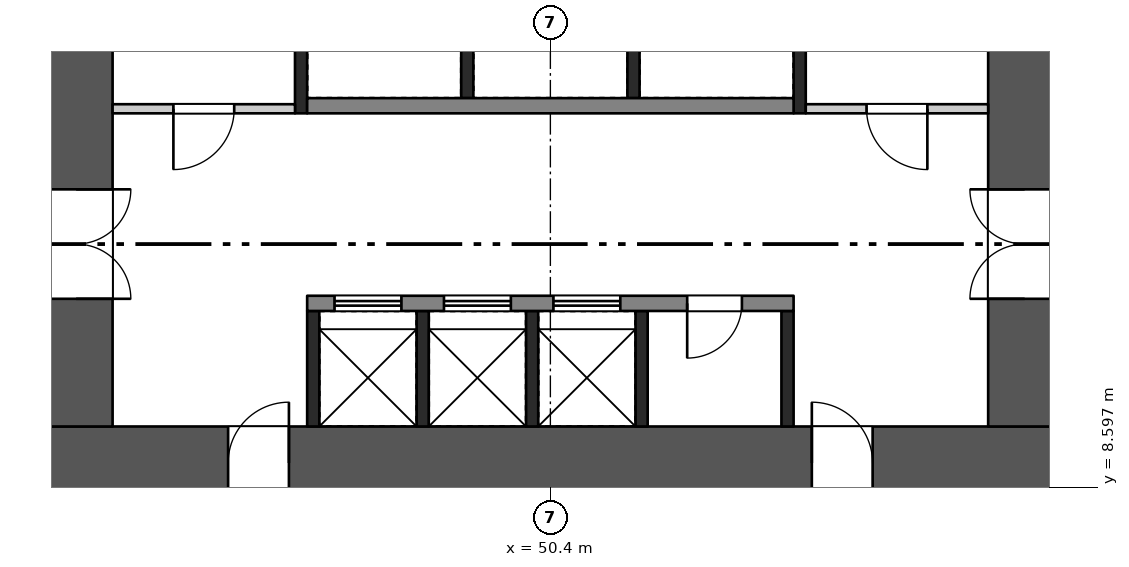
"""IFC4 building model, lengths in metres.
Left out: names, types, materials, properties, quantities, classifications, styles, units other than length and angle.
Written with IfcOpenShell. Run it as: python <this file> out.ifc"""

import sys

from ifc_helpers import new_model, si_unit, direction, frame, frame_2d, origin, place, context, subcontext, project, spatial, rectangle, extrude, element, fill, save


model = new_model("IFC4")
c1 = context("Model", 3, precision=1e-05, world=origin(), true_north=direction((0.0, 1.0)))
c2 = subcontext(c1, "Body", "Model", "MODEL_VIEW")
j1 = project(units=[si_unit("LENGTHUNIT", "METRE"), si_unit("PLANEANGLEUNIT", "RADIAN")], contexts=[c1])
p1 = place(None, origin())
s1 = spatial("IfcSite", under=j1, at=p1, CompositionType="ELEMENT")
p2 = place(p1, origin())
s2 = spatial("IfcBuilding", under=s1, at=p2, CompositionType="ELEMENT")
p3 = place(p2, frame((0.0, 0.0, 67.2)))
s3 = spatial("IfcBuildingStorey", under=s2, at=p3, CompositionType="ELEMENT", Elevation=67.2)
p4 = place(p3, frame((42.0, 9.0, 0.0), z_axis=(0.0, 0.0, 1.0), x_axis=(1.0, 0.0, 0.0)))
e1 = element("IfcWall", 1, at=p4, inside=s3, PredefinedType="SHEAR", context=c2, shape_type="SweptSolid", body=[
    extrude(rectangle(XDim=16.8, YDim=1.2, at=frame_2d((8.4, 0.0))), origin(), (0.0, 0.0, 1.0), 3.22),
])
p5 = place(p4, frame((3.1, 0.0, 0.0)))
e2 = element("IfcOpeningElement", 2, at=p5, cuts=e1, PredefinedType="OPENING", context=c2, shape_type="SweptSolid", body=[
    extrude(rectangle(XDim=1.0, YDim=2.1, at=frame_2d((0.5, 1.05))), frame((0.0, 0.61, 0.0), z_axis=(0.0, -1.0, 0.0), x_axis=(1.0, 0.0, 0.0)), (0.0, 0.0, 1.0), 1.22),
])
p6 = place(p4, frame((12.7, 0.0, 0.0)))
e3 = element("IfcOpeningElement", 3, at=p6, cuts=e1, PredefinedType="OPENING", context=c2, shape_type="SweptSolid", body=[
    extrude(rectangle(XDim=1.0, YDim=2.1, at=frame_2d((0.5, 1.05))), frame((0.0, 0.61, 0.0), z_axis=(0.0, -1.0, 0.0), x_axis=(1.0, 0.0, 0.0)), (0.0, 0.0, 1.0), 1.22),
])
p7 = place(p3, frame((42.6, 9.6, 0.0), z_axis=(0.0, 0.0, 1.0), x_axis=(0.0, 1.0, 0.0)))
e4 = element("IfcWall", 4, at=p7, inside=s3, PredefinedType="SHEAR", context=c2, shape_type="SweptSolid", body=[
    extrude(rectangle(XDim=14.4, YDim=1.2, at=frame_2d((7.2, 0.0))), origin(), (0.0, 0.0, 1.0), 3.22),
])
p8 = place(p7, frame((2.1, 0.0, 0.0)))
e5 = element("IfcOpeningElement", 5, at=p8, cuts=e4, PredefinedType="OPENING", context=c2, shape_type="SweptSolid", body=[
    extrude(rectangle(XDim=1.8, YDim=2.1, at=frame_2d((0.9, 1.05))), frame((0.0, 0.61, 0.0), z_axis=(0.0, -1.0, 0.0), x_axis=(1.0, 0.0, 0.0)), (0.0, 0.0, 1.0), 1.22),
])
p9 = place(p3, frame((58.2, 9.6, 0.0), z_axis=(0.0, 0.0, 1.0), x_axis=(0.0, 1.0, 0.0)))
e6 = element("IfcWall", 6, at=p9, inside=s3, PredefinedType="SHEAR", context=c2, shape_type="SweptSolid", body=[
    extrude(rectangle(XDim=14.4, YDim=1.2, at=frame_2d((7.2, 0.0))), origin(), (0.0, 0.0, 1.0), 3.22),
])
p10 = place(p9, frame((2.1, 0.0, 0.0)))
e7 = element("IfcOpeningElement", 7, at=p10, cuts=e6, PredefinedType="OPENING", context=c2, shape_type="SweptSolid", body=[
    extrude(rectangle(XDim=1.8, YDim=2.1, at=frame_2d((0.9, 1.05))), frame((0.0, 0.61, 0.0), z_axis=(0.0, -1.0, 0.0), x_axis=(1.0, 0.0, 0.0)), (0.0, 0.0, 1.0), 1.22),
])
for number, where, z_axis, x_axis in (
    (8, (46.5, 9.6, 0.0), (0.0, 0.0, 1.0), (0.0, 1.0, 0.0)),
    (9, (48.3, 9.6, 0.0), (0.0, 0.0, 1.0), (0.0, 1.0, 0.0)),
    (10, (50.1, 9.6, 0.0), (0.0, 0.0, 1.0), (0.0, 1.0, 0.0)),
    (11, (51.9, 9.6, 0.0), (0.0, 0.0, 1.0), (0.0, 1.0, 0.0)),
    (12, (54.3, 9.6, 0.0), (0.0, 0.0, 1.0), (0.0, 1.0, 0.0)),
):
    element("IfcWall", number, at=place(p3, frame(where, z_axis=z_axis, x_axis=x_axis)), inside=s3, PredefinedType="SHEAR", context=c2, shape_type="SweptSolid", body=[
        extrude(rectangle(XDim=1.9, YDim=0.2, at=frame_2d((0.95, 0.0))), origin(), (0.0, 0.0, 1.0), 3.22),
    ])
p11 = place(p3, frame((46.4, 11.625, 0.0), z_axis=(0.0, 0.0, 1.0), x_axis=(1.0, 0.0, 0.0)))
e13 = element("IfcWall", 13, at=p11, inside=s3, PredefinedType="SHEAR", context=c2, shape_type="SweptSolid", body=[
    extrude(rectangle(XDim=8.0, YDim=0.25, at=frame_2d((4.0, 0.0))), origin(), (0.0, 0.0, 1.0), 3.22),
])
p12 = place(p11, frame((0.45, 0.0, 0.0)))
e14 = element("IfcOpeningElement", 14, at=p12, cuts=e13, PredefinedType="OPENING", context=c2, shape_type="SweptSolid", body=[
    extrude(rectangle(XDim=1.1, YDim=2.1, at=frame_2d((0.55, 1.05))), frame((0.0, 0.135, 0.0), z_axis=(0.0, -1.0, 0.0), x_axis=(1.0, 0.0, 0.0)), (0.0, 0.0, 1.0), 0.27),
])
p13 = place(p11, frame((2.25, 0.0, 0.0)))
e15 = element("IfcOpeningElement", 15, at=p13, cuts=e13, PredefinedType="OPENING", context=c2, shape_type="SweptSolid", body=[
    extrude(rectangle(XDim=1.1, YDim=2.1, at=frame_2d((0.55, 1.05))), frame((0.0, 0.135, 0.0), z_axis=(0.0, -1.0, 0.0), x_axis=(1.0, 0.0, 0.0)), (0.0, 0.0, 1.0), 0.27),
])
p14 = place(p11, frame((4.05, 0.0, 0.0)))
e16 = element("IfcOpeningElement", 16, at=p14, cuts=e13, PredefinedType="OPENING", context=c2, shape_type="SweptSolid", body=[
    extrude(rectangle(XDim=1.1, YDim=2.1, at=frame_2d((0.55, 1.05))), frame((0.0, 0.135, 0.0), z_axis=(0.0, -1.0, 0.0), x_axis=(1.0, 0.0, 0.0)), (0.0, 0.0, 1.0), 0.27),
])
p15 = place(p11, frame((6.25, 0.0, 0.0)))
e17 = element("IfcOpeningElement", 17, at=p15, cuts=e13, PredefinedType="OPENING", context=c2, shape_type="SweptSolid", body=[
    extrude(rectangle(XDim=0.9, YDim=2.1, at=frame_2d((0.45, 1.05))), frame((0.0, 0.135, 0.0), z_axis=(0.0, -1.0, 0.0), x_axis=(1.0, 0.0, 0.0)), (0.0, 0.0, 1.0), 0.27),
])
for number, where, z_axis, x_axis in (
    (18, (49.033, 15.0, 0.0), (0.0, 0.0, 1.0), (0.0, 1.0, 0.0)),
    (19, (51.767, 15.0, 0.0), (0.0, 0.0, 1.0), (0.0, 1.0, 0.0)),
):
    element("IfcWall", number, at=place(p3, frame(where, z_axis=z_axis, x_axis=x_axis)), inside=s3, PredefinedType="SHEAR", context=c2, shape_type="SweptSolid", body=[
        extrude(rectangle(XDim=1.9, YDim=0.2, at=frame_2d((0.95, 0.0))), origin(), (0.0, 0.0, 1.0), 3.22),
    ])
p16 = place(p3, frame((46.4, 14.875, 0.0), z_axis=(0.0, 0.0, 1.0), x_axis=(1.0, 0.0, 0.0)))
e20 = element("IfcWall", 20, at=p16, inside=s3, PredefinedType="SHEAR", context=c2, shape_type="SweptSolid", body=[
    extrude(rectangle(XDim=8.0, YDim=0.25, at=frame_2d((4.0, 0.0))), origin(), (0.0, 0.0, 1.0), 3.22),
])
p17 = place(p3, frame((46.3, 14.75, 0.0), z_axis=(0.0, 0.0, 1.0), x_axis=(0.0, 1.0, 0.0)))
e21 = element("IfcWall", 21, at=p17, inside=s3, PredefinedType="SHEAR", context=c2, shape_type="SweptSolid", body=[
    extrude(rectangle(XDim=2.4, YDim=0.2, at=frame_2d((1.2, 0.0))), origin(), (0.0, 0.0, 1.0), 3.22),
])
p18 = place(p3, frame((43.2, 14.825, 0.0), z_axis=(0.0, 0.0, 1.0), x_axis=(1.0, 0.0, 0.0)))
e22 = element("IfcWall", 22, at=p18, inside=s3, PredefinedType="PARTITIONING", context=c2, shape_type="SweptSolid", body=[
    extrude(rectangle(XDim=3.0, YDim=0.15, at=frame_2d((1.5, 0.0))), origin(), (0.0, 0.0, 1.0), 3.22),
])
p19 = place(p18, frame((1.0, 0.0, 0.0)))
e23 = element("IfcOpeningElement", 23, at=p19, cuts=e22, PredefinedType="OPENING", context=c2, shape_type="SweptSolid", body=[
    extrude(rectangle(XDim=1.0, YDim=2.1, at=frame_2d((0.5, 1.05))), frame((0.0, 0.085, 0.0), z_axis=(0.0, -1.0, 0.0), x_axis=(1.0, 0.0, 0.0)), (0.0, 0.0, 1.0), 0.17),
])
p20 = place(p3, frame((54.5, 14.75, 0.0), z_axis=(0.0, 0.0, 1.0), x_axis=(0.0, 1.0, 0.0)))
e24 = element("IfcWall", 24, at=p20, inside=s3, PredefinedType="SHEAR", context=c2, shape_type="SweptSolid", body=[
    extrude(rectangle(XDim=2.4, YDim=0.2, at=frame_2d((1.2, 0.0))), origin(), (0.0, 0.0, 1.0), 3.22),
])
p21 = place(p3, frame((54.6, 14.825, 0.0), z_axis=(0.0, 0.0, 1.0), x_axis=(1.0, 0.0, 0.0)))
e25 = element("IfcWall", 25, at=p21, inside=s3, PredefinedType="PARTITIONING", context=c2, shape_type="SweptSolid", body=[
    extrude(rectangle(XDim=3.0, YDim=0.15, at=frame_2d((1.5, 0.0))), origin(), (0.0, 0.0, 1.0), 3.22),
])
p22 = place(p21, frame((1.0, 0.0, 0.0)))
e26 = element("IfcOpeningElement", 26, at=p22, cuts=e25, PredefinedType="OPENING", context=c2, shape_type="SweptSolid", body=[
    extrude(rectangle(XDim=1.0, YDim=2.1, at=frame_2d((0.5, 1.05))), frame((0.0, 0.085, 0.0), z_axis=(0.0, -1.0, 0.0), x_axis=(1.0, 0.0, 0.0)), (0.0, 0.0, 1.0), 0.17),
])
p23 = place(p5, origin())
e27 = element("IfcDoor", 27, at=p23, inside=s3, OperationType="SINGLE_SWING_RIGHT", PredefinedType="DOOR", context=c2, shape_type="SweptSolid", body=[
    extrude(rectangle(XDim=1.0, YDim=2.1, at=frame_2d((0.5, 1.05))), frame((0.0, 0.025, 0.0), z_axis=(0.0, -1.0, 0.0), x_axis=(1.0, 0.0, 0.0)), (0.0, 0.0, 1.0), 0.05),
])
fill(e2, e27)
p24 = place(p6, origin())
e28 = element("IfcDoor", 28, at=p24, inside=s3, OperationType="SINGLE_SWING_LEFT", PredefinedType="DOOR", context=c2, shape_type="SweptSolid", body=[
    extrude(rectangle(XDim=1.0, YDim=2.1, at=frame_2d((0.5, 1.05))), frame((0.0, 0.025, 0.0), z_axis=(0.0, -1.0, 0.0), x_axis=(1.0, 0.0, 0.0)), (0.0, 0.0, 1.0), 0.05),
])
fill(e3, e28)
p25 = place(p8, frame((1.8, 0.0, 0.0), z_axis=(0.0, 0.0, 1.0), x_axis=(-1.0, 0.0, 0.0)))
e29 = element("IfcDoor", 29, at=p25, inside=s3, OperationType="DOUBLE_DOOR_SINGLE_SWING", PredefinedType="DOOR", context=c2, shape_type="SweptSolid", body=[
    extrude(rectangle(XDim=1.8, YDim=2.1, at=frame_2d((0.9, 1.05))), frame((0.0, 0.025, 0.0), z_axis=(0.0, -1.0, 0.0), x_axis=(1.0, 0.0, 0.0)), (0.0, 0.0, 1.0), 0.05),
])
fill(e5, e29)
p26 = place(p10, origin())
e30 = element("IfcDoor", 30, at=p26, inside=s3, OperationType="DOUBLE_DOOR_SINGLE_SWING", PredefinedType="DOOR", context=c2, shape_type="SweptSolid", body=[
    extrude(rectangle(XDim=1.8, YDim=2.1, at=frame_2d((0.9, 1.05))), frame((0.0, 0.025, 0.0), z_axis=(0.0, -1.0, 0.0), x_axis=(1.0, 0.0, 0.0)), (0.0, 0.0, 1.0), 0.05),
])
fill(e7, e30)
p27 = place(p12, origin())
e31 = element("IfcDoor", 31, at=p27, inside=s3, OperationType="DOUBLE_DOOR_SLIDING", PredefinedType="DOOR", context=c2, shape_type="SweptSolid", body=[
    extrude(rectangle(XDim=1.1, YDim=2.1, at=frame_2d((0.55, 1.05))), frame((0.0, 0.025, 0.0), z_axis=(0.0, -1.0, 0.0), x_axis=(1.0, 0.0, 0.0)), (0.0, 0.0, 1.0), 0.05),
])
fill(e14, e31)
p28 = place(p13, origin())
e32 = element("IfcDoor", 32, at=p28, inside=s3, OperationType="DOUBLE_DOOR_SLIDING", PredefinedType="DOOR", context=c2, shape_type="SweptSolid", body=[
    extrude(rectangle(XDim=1.1, YDim=2.1, at=frame_2d((0.55, 1.05))), frame((0.0, 0.025, 0.0), z_axis=(0.0, -1.0, 0.0), x_axis=(1.0, 0.0, 0.0)), (0.0, 0.0, 1.0), 0.05),
])
fill(e15, e32)
p29 = place(p14, origin())
e33 = element("IfcDoor", 33, at=p29, inside=s3, OperationType="DOUBLE_DOOR_SLIDING", PredefinedType="DOOR", context=c2, shape_type="SweptSolid", body=[
    extrude(rectangle(XDim=1.1, YDim=2.1, at=frame_2d((0.55, 1.05))), frame((0.0, 0.025, 0.0), z_axis=(0.0, -1.0, 0.0), x_axis=(1.0, 0.0, 0.0)), (0.0, 0.0, 1.0), 0.05),
])
fill(e16, e33)
p30 = place(p15, frame((0.9, 0.0, 0.0), z_axis=(0.0, 0.0, 1.0), x_axis=(-1.0, 0.0, 0.0)))
e34 = element("IfcDoor", 34, at=p30, inside=s3, OperationType="SINGLE_SWING_RIGHT", PredefinedType="DOOR", context=c2, shape_type="SweptSolid", body=[
    extrude(rectangle(XDim=0.9, YDim=2.1, at=frame_2d((0.45, 1.05))), frame((0.0, 0.025, 0.0), z_axis=(0.0, -1.0, 0.0), x_axis=(1.0, 0.0, 0.0)), (0.0, 0.0, 1.0), 0.05),
])
fill(e17, e34)
p31 = place(p19, frame((1.0, 0.0, 0.0), z_axis=(0.0, 0.0, 1.0), x_axis=(-1.0, 0.0, 0.0)))
e35 = element("IfcDoor", 35, at=p31, inside=s3, OperationType="SINGLE_SWING_RIGHT", PredefinedType="DOOR", context=c2, shape_type="SweptSolid", body=[
    extrude(rectangle(XDim=1.0, YDim=2.1, at=frame_2d((0.5, 1.05))), frame((0.0, 0.025, 0.0), z_axis=(0.0, -1.0, 0.0), x_axis=(1.0, 0.0, 0.0)), (0.0, 0.0, 1.0), 0.05),
])
fill(e23, e35)
p32 = place(p22, frame((1.0, 0.0, 0.0), z_axis=(0.0, 0.0, 1.0), x_axis=(-1.0, 0.0, 0.0)))
e36 = element("IfcDoor", 36, at=p32, inside=s3, OperationType="SINGLE_SWING_LEFT", PredefinedType="DOOR", context=c2, shape_type="SweptSolid", body=[
    extrude(rectangle(XDim=1.0, YDim=2.1, at=frame_2d((0.5, 1.05))), frame((0.0, 0.025, 0.0), z_axis=(0.0, -1.0, 0.0), x_axis=(1.0, 0.0, 0.0)), (0.0, 0.0, 1.0), 0.05),
])
fill(e26, e36)
save(model, sys.argv[1])
